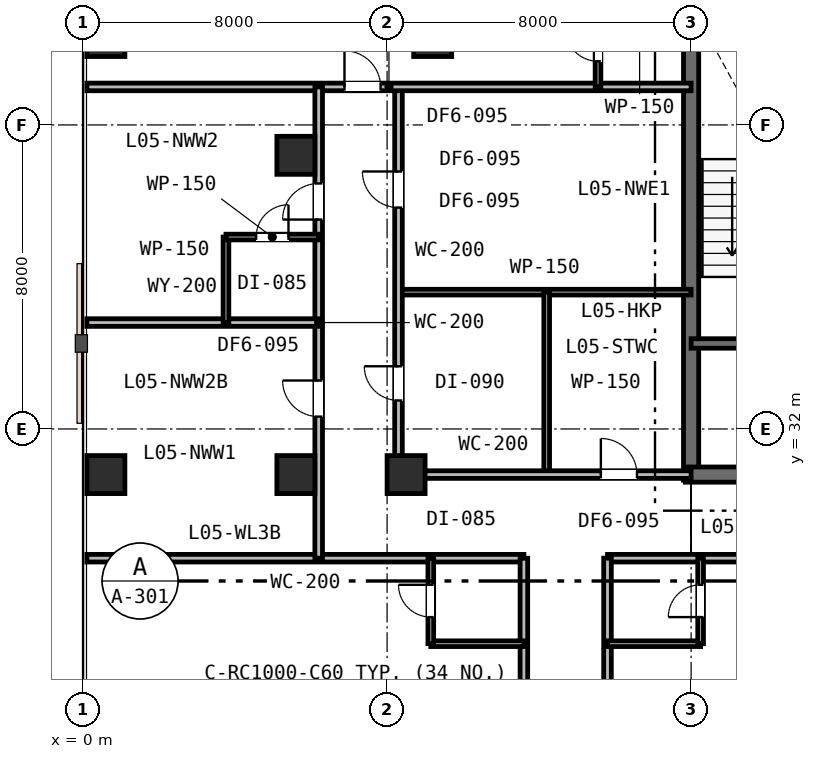
"""IFC4 building model, lengths in metres.
Left out: names, types, materials, properties, quantities, classifications, styles, units other than length and angle.
Written with IfcOpenShell. Run it as: python <this file> out.ifc"""

import sys

from ifc_helpers import new_model, si_unit, direction, frame, frame_2d, origin, origin_2d, place, context, subcontext, project, spatial, rectangle, extrude, element, fill, save


model = new_model("IFC4")
c1 = context("Model", 3, precision=1e-05, world=origin(), true_north=direction((0.0, 1.0)))
c2 = subcontext(c1, "Body", "Model", "MODEL_VIEW")
j1 = project(units=[si_unit("LENGTHUNIT", "METRE"), si_unit("PLANEANGLEUNIT", "RADIAN")], contexts=[c1])
p1 = place(None, origin())
s1 = spatial("IfcSite", under=j1, at=p1, CompositionType="ELEMENT")
p2 = place(p1, origin())
s2 = spatial("IfcBuilding", under=s1, at=p2, CompositionType="ELEMENT")
p3 = place(p2, frame((0.0, 0.0, 25.8)))
s3 = spatial("IfcBuildingStorey", under=s2, at=p3, CompositionType="ELEMENT", Elevation=25.8)
p4 = place(p3, frame((16.0, 30.65, 0.0), z_axis=(0.0, 0.0, 1.0), x_axis=(0.0, 1.0, 0.0)))
e1 = element("IfcWall", 1, at=p4, inside=s3, PredefinedType="SHEAR", context=c2, shape_type="SweptSolid", body=[
    extrude(rectangle(XDim=12.3, YDim=0.4, at=frame_2d((6.15, 0.0))), origin(), (0.0, 0.0, 1.0), 3.6),
])
p5 = place(p3, frame((15.85, 30.8, 0.0), z_axis=(0.0, 0.0, 1.0), x_axis=(1.0, 0.0, 0.0)))
e2 = element("IfcWall", 2, at=p5, inside=s3, PredefinedType="SHEAR", context=c2, shape_type="SweptSolid", body=[
    extrude(rectangle(XDim=11.2, YDim=0.4, at=frame_2d((5.6, 0.0))), origin(), (0.0, 0.0, 1.0), 3.6),
])
p6 = place(p5, frame((2.45, 0.0, 0.0)))
e3 = element("IfcOpeningElement", 3, at=p6, cuts=e2, PredefinedType="OPENING", context=c2, shape_type="SweptSolid", body=[
    extrude(rectangle(XDim=1.1, YDim=2.15, at=frame_2d((0.55, 1.075))), frame((0.0, 0.21, 0.0), z_axis=(0.0, -1.0, 0.0), x_axis=(1.0, 0.0, 0.0)), (0.0, 0.0, 1.0), 0.42),
])
p7 = place(p3, frame((16.0, 34.25, 0.0), z_axis=(0.0, 0.0, 1.0), x_axis=(1.0, 0.0, 0.0)))
e4 = element("IfcWall", 4, at=p7, inside=s3, PredefinedType="SHEAR", context=c2, shape_type="SweptSolid", body=[
    extrude(rectangle(XDim=6.05, YDim=0.25, at=frame_2d((3.025, 0.0))), origin(), (0.0, 0.0, 1.0), 3.6),
])
p8 = place(p7, frame((1.25, 0.0, 0.0)))
e5 = element("IfcOpeningElement", 5, at=p8, cuts=e4, PredefinedType="OPENING", context=c2, shape_type="SweptSolid", body=[
    extrude(rectangle(XDim=1.0, YDim=2.15, at=frame_2d((0.5, 1.075))), frame((0.0, 0.135, 0.0), z_axis=(0.0, -1.0, 0.0), x_axis=(1.0, 0.0, 0.0)), (0.0, 0.0, 1.0), 0.27),
])
p9 = place(p7, frame((4.2, 0.0, 0.0)))
e6 = element("IfcOpeningElement", 6, at=p9, cuts=e4, PredefinedType="OPENING", context=c2, shape_type="SweptSolid", body=[
    extrude(rectangle(XDim=1.1, YDim=2.15, at=frame_2d((0.55, 1.075))), frame((0.0, 0.135, 0.0), z_axis=(0.0, -1.0, 0.0), x_axis=(1.0, 0.0, 0.0)), (0.0, 0.0, 1.0), 0.27),
])
for number, where, z_axis, x_axis in (
    (7, (5.6, 30.8, 0.0), (0.0, 0.0, 1.0), (1.0, 0.0, 0.0)),
    (8, (5.6, 39.2, 0.0), (0.0, 0.0, 1.0), (1.0, 0.0, 0.0)),
    (9, (8.5, 30.8, 0.0), (0.0, 0.0, 1.0), (1.0, 0.0, 0.0)),
    (10, (9.2, 42.3, 0.0), (0.0, 0.0, 1.0), (1.0, 0.0, 0.0)),
    (11, (0.6, 30.8, 0.0), (0.0, 0.0, 1.0), (1.0, 0.0, 0.0)),
    (12, (0.6, 42.3, 0.0), (0.0, 0.0, 1.0), (1.0, 0.0, 0.0)),
):
    element("IfcColumn", number, at=place(p3, frame(where, z_axis=z_axis, x_axis=x_axis)), inside=s3, PredefinedType="COLUMN", context=c2, shape_type="SweptSolid", body=[
        extrude(rectangle(XDim=1.0, YDim=1.0, at=origin_2d()), origin(), (0.0, 0.0, 1.0), 3.6),
    ])
p10 = place(p3, frame((0.1, 28.6, 0.0), z_axis=(0.0, 0.0, 1.0), x_axis=(1.0, 0.0, 0.0)))
e13 = element("IfcWall", 13, at=p10, inside=s3, PredefinedType="PARTITIONING", context=c2, shape_type="SweptSolid", body=[
    extrude(rectangle(XDim=11.5, YDim=0.2, at=frame_2d((5.75, 0.0))), origin(), (0.0, 0.0, 1.0), 2.68),
])
p11 = place(p3, frame((13.8, 28.6, 0.0), z_axis=(0.0, 0.0, 1.0), x_axis=(1.0, 0.0, 0.0)))
e14 = element("IfcWall", 14, at=p11, inside=s3, PredefinedType="PARTITIONING", context=c2, shape_type="SweptSolid", body=[
    extrude(rectangle(XDim=36.6, YDim=0.2, at=frame_2d((18.3, 0.0))), origin(), (0.0, 0.0, 1.0), 2.68),
])
p12 = place(p11, frame((12.3, 0.0, 0.0)))
e15 = element("IfcOpeningElement", 15, at=p12, cuts=e14, PredefinedType="OPENING", context=c2, shape_type="SweptSolid", body=[
    extrude(rectangle(XDim=0.95, YDim=2.15, at=frame_2d((0.475, 1.075))), frame((0.0, 0.11, 0.0), z_axis=(0.0, -1.0, 0.0), x_axis=(1.0, 0.0, 0.0)), (0.0, 0.0, 1.0), 0.22),
])
p13 = place(p11, frame((20.075, 0.0, 0.0)))
e16 = element("IfcOpeningElement", 16, at=p13, cuts=e14, PredefinedType="OPENING", context=c2, shape_type="SweptSolid", body=[
    extrude(rectangle(XDim=0.95, YDim=2.15, at=frame_2d((0.475, 1.075))), frame((0.0, 0.11, 0.0), z_axis=(0.0, -1.0, 0.0), x_axis=(1.0, 0.0, 0.0)), (0.0, 0.0, 1.0), 0.22),
])
p14 = place(p11, frame((26.829, 0.0, 0.0)))
e17 = element("IfcOpeningElement", 17, at=p14, cuts=e14, PredefinedType="OPENING", context=c2, shape_type="SweptSolid", body=[
    extrude(rectangle(XDim=0.95, YDim=2.15, at=frame_2d((0.475, 1.075))), frame((0.0, 0.11, 0.0), z_axis=(0.0, -1.0, 0.0), x_axis=(1.0, 0.0, 0.0)), (0.0, 0.0, 1.0), 0.22),
])
p15 = place(p11, frame((32.669, 0.0, 0.0)))
e18 = element("IfcOpeningElement", 18, at=p15, cuts=e14, PredefinedType="OPENING", context=c2, shape_type="SweptSolid", body=[
    extrude(rectangle(XDim=0.95, YDim=2.15, at=frame_2d((0.475, 1.075))), frame((0.0, 0.11, 0.0), z_axis=(0.0, -1.0, 0.0), x_axis=(1.0, 0.0, 0.0)), (0.0, 0.0, 1.0), 0.22),
])
p16 = place(p3, frame((8.3, 35.6, 0.0), z_axis=(0.0, 0.0, 1.0), x_axis=(1.0, 0.0, 0.0)))
e19 = element("IfcWall", 19, at=p16, inside=s3, PredefinedType="PARTITIONING", context=c2, shape_type="SweptSolid", body=[
    extrude(rectangle(XDim=7.7, YDim=0.15, at=frame_2d((3.85, 0.0))), origin(), (0.0, 0.0, 1.0), 2.68),
])
p17 = place(p3, frame((12.2, 30.8, 0.0), z_axis=(0.0, 0.0, 1.0), x_axis=(0.0, 1.0, 0.0)))
e20 = element("IfcWall", 20, at=p17, inside=s3, PredefinedType="PARTITIONING", context=c2, shape_type="SweptSolid", body=[
    extrude(rectangle(XDim=4.8, YDim=0.15, at=frame_2d((2.4, 0.0))), origin(), (0.0, 0.0, 1.0), 2.68),
])
p18 = place(p3, frame((8.3, 30.8, 0.0), z_axis=(0.0, 0.0, 1.0), x_axis=(1.0, 0.0, 0.0)))
e21 = element("IfcWall", 21, at=p18, inside=s3, PredefinedType="PARTITIONING", context=c2, shape_type="SweptSolid", body=[
    extrude(rectangle(XDim=7.7, YDim=0.2, at=frame_2d((3.85, 0.0))), origin(), (0.0, 0.0, 1.0), 2.68),
])
p19 = place(p18, frame((5.325, 0.0, 0.0)))
e22 = element("IfcOpeningElement", 22, at=p19, cuts=e21, PredefinedType="OPENING", context=c2, shape_type="SweptSolid", body=[
    extrude(rectangle(XDim=0.95, YDim=2.15, at=frame_2d((0.475, 1.075))), frame((0.0, 0.11, 0.0), z_axis=(0.0, -1.0, 0.0), x_axis=(1.0, 0.0, 0.0)), (0.0, 0.0, 1.0), 0.22),
])
p20 = place(p3, frame((8.3, 30.8, 0.0), z_axis=(0.0, 0.0, 1.0), x_axis=(0.0, 1.0, 0.0)))
e23 = element("IfcWall", 23, at=p20, inside=s3, PredefinedType="PARTITIONING", context=c2, shape_type="SweptSolid", body=[
    extrude(rectangle(XDim=10.2, YDim=0.2, at=frame_2d((5.1, 0.0))), origin(), (0.0, 0.0, 1.0), 2.68),
])
p21 = place(p20, frame((1.95, 0.0, 0.0)))
e24 = element("IfcOpeningElement", 24, at=p21, cuts=e23, PredefinedType="OPENING", context=c2, shape_type="SweptSolid", body=[
    extrude(rectangle(XDim=0.9, YDim=2.15, at=frame_2d((0.45, 1.075))), frame((0.0, 0.11, 0.0), z_axis=(0.0, -1.0, 0.0), x_axis=(1.0, 0.0, 0.0)), (0.0, 0.0, 1.0), 0.22),
])
p22 = place(p20, frame((7.025, 0.0, 0.0)))
e25 = element("IfcOpeningElement", 25, at=p22, cuts=e23, PredefinedType="OPENING", context=c2, shape_type="SweptSolid", body=[
    extrude(rectangle(XDim=0.95, YDim=2.15, at=frame_2d((0.475, 1.075))), frame((0.0, 0.11, 0.0), z_axis=(0.0, -1.0, 0.0), x_axis=(1.0, 0.0, 0.0)), (0.0, 0.0, 1.0), 0.22),
])
p23 = place(p3, frame((0.1, 41.0, 0.0), z_axis=(0.0, 0.0, 1.0), x_axis=(1.0, 0.0, 0.0)))
e26 = element("IfcWall", 26, at=p23, inside=s3, PredefinedType="PARTITIONING", context=c2, shape_type="SweptSolid", body=[
    extrude(rectangle(XDim=15.9, YDim=0.2, at=frame_2d((7.95, 0.0))), origin(), (0.0, 0.0, 1.0), 2.68),
])
p24 = place(p23, frame((6.779, 0.0, 0.0)))
e27 = element("IfcOpeningElement", 27, at=p24, cuts=e26, PredefinedType="OPENING", context=c2, shape_type="SweptSolid", body=[
    extrude(rectangle(XDim=0.95, YDim=2.15, at=frame_2d((0.475, 1.075))), frame((0.0, 0.11, 0.0), z_axis=(0.0, -1.0, 0.0), x_axis=(1.0, 0.0, 0.0)), (0.0, 0.0, 1.0), 0.22),
])
p25 = place(p3, frame((13.55, 41.0, 0.0), z_axis=(0.0, 0.0, 1.0), x_axis=(0.0, 1.0, 0.0)))
e28 = element("IfcWall", 28, at=p25, inside=s3, PredefinedType="PARTITIONING", context=c2, shape_type="SweptSolid", body=[
    extrude(rectangle(XDim=2.2, YDim=0.15, at=frame_2d((1.1, 0.0))), origin(), (0.0, 0.0, 1.0), 3.33),
])
p26 = place(p25, frame((0.675, 0.0, 0.0)))
e29 = element("IfcOpeningElement", 29, at=p26, cuts=e28, PredefinedType="OPENING", context=c2, shape_type="SweptSolid", body=[
    extrude(rectangle(XDim=0.85, YDim=2.15, at=frame_2d((0.425, 1.075))), frame((0.0, 0.085, 0.0), z_axis=(0.0, -1.0, 0.0), x_axis=(1.0, 0.0, 0.0)), (0.0, 0.0, 1.0), 0.17),
])
p27 = place(p3, frame((6.2, 28.6, 0.0), z_axis=(0.0, 0.0, 1.0), x_axis=(0.0, 1.0, 0.0)))
e30 = element("IfcWall", 30, at=p27, inside=s3, PredefinedType="PARTITIONING", context=c2, shape_type="SweptSolid", body=[
    extrude(rectangle(XDim=12.4, YDim=0.2, at=frame_2d((6.2, 0.0))), origin(), (0.0, 0.0, 1.0), 2.68),
])
p28 = place(p27, frame((3.725, 0.0, 0.0)))
e31 = element("IfcOpeningElement", 31, at=p28, cuts=e30, PredefinedType="OPENING", context=c2, shape_type="SweptSolid", body=[
    extrude(rectangle(XDim=0.95, YDim=2.15, at=frame_2d((0.475, 1.075))), frame((0.0, 0.11, 0.0), z_axis=(0.0, -1.0, 0.0), x_axis=(1.0, 0.0, 0.0)), (0.0, 0.0, 1.0), 0.22),
])
p29 = place(p27, frame((8.91, 0.0, 0.0)))
e32 = element("IfcOpeningElement", 32, at=p29, cuts=e30, PredefinedType="OPENING", context=c2, shape_type="SweptSolid", body=[
    extrude(rectangle(XDim=0.95, YDim=2.15, at=frame_2d((0.475, 1.075))), frame((0.0, 0.11, 0.0), z_axis=(0.0, -1.0, 0.0), x_axis=(1.0, 0.0, 0.0)), (0.0, 0.0, 1.0), 0.22),
])
p30 = place(p3, frame((0.1, 34.8, 0.0), z_axis=(0.0, 0.0, 1.0), x_axis=(1.0, 0.0, 0.0)))
e33 = element("IfcWall", 33, at=p30, inside=s3, PredefinedType="PARTITIONING", context=c2, shape_type="SweptSolid", body=[
    extrude(rectangle(XDim=6.1, YDim=0.2, at=frame_2d((3.05, 0.0))), origin(), (0.0, 0.0, 1.0), 2.68),
])
p31 = place(p3, frame((3.76, 34.8, 0.0), z_axis=(0.0, 0.0, 1.0), x_axis=(0.0, 1.0, 0.0)))
e34 = element("IfcWall", 34, at=p31, inside=s3, PredefinedType="PARTITIONING", context=c2, shape_type="SweptSolid", body=[
    extrude(rectangle(XDim=2.25, YDim=0.15, at=frame_2d((1.125, 0.0))), origin(), (0.0, 0.0, 1.0), 3.33),
])
p32 = place(p3, frame((3.76, 37.05, 0.0), z_axis=(0.0, 0.0, 1.0), x_axis=(1.0, 0.0, 0.0)))
e35 = element("IfcWall", 35, at=p32, inside=s3, PredefinedType="PARTITIONING", context=c2, shape_type="SweptSolid", body=[
    extrude(rectangle(XDim=2.44, YDim=0.15, at=frame_2d((1.22, 0.0))), origin(), (0.0, 0.0, 1.0), 2.68),
])
p33 = place(p32, frame((0.795, 0.0, 0.0)))
e36 = element("IfcOpeningElement", 36, at=p33, cuts=e35, PredefinedType="OPENING", context=c2, shape_type="SweptSolid", body=[
    extrude(rectangle(XDim=0.85, YDim=2.15, at=frame_2d((0.425, 1.075))), frame((0.0, 0.085, 0.0), z_axis=(0.0, -1.0, 0.0), x_axis=(1.0, 0.0, 0.0)), (0.0, 0.0, 1.0), 0.17),
])
p34 = place(p3, frame((11.6, 5.6, 0.0), z_axis=(0.0, 0.0, 1.0), x_axis=(0.0, 1.0, 0.0)))
e37 = element("IfcWall", 37, at=p34, inside=s3, PredefinedType="PARTITIONING", context=c2, shape_type="SweptSolid", body=[
    extrude(rectangle(XDim=23.0, YDim=0.2, at=frame_2d((11.5, 0.0))), origin(), (0.0, 0.0, 1.0), 2.68),
])
p35 = place(p34, frame((2.19, 0.0, 0.0)))
e38 = element("IfcOpeningElement", 38, at=p35, cuts=e37, PredefinedType="OPENING", context=c2, shape_type="SweptSolid", body=[
    extrude(rectangle(XDim=0.95, YDim=2.15, at=frame_2d((0.475, 1.075))), frame((0.0, 0.11, 0.0), z_axis=(0.0, -1.0, 0.0), x_axis=(1.0, 0.0, 0.0)), (0.0, 0.0, 1.0), 0.22),
])
p36 = place(p34, frame((9.29, 0.0, 0.0)))
e39 = element("IfcOpeningElement", 39, at=p36, cuts=e37, PredefinedType="OPENING", context=c2, shape_type="SweptSolid", body=[
    extrude(rectangle(XDim=0.95, YDim=2.15, at=frame_2d((0.475, 1.075))), frame((0.0, 0.11, 0.0), z_axis=(0.0, -1.0, 0.0), x_axis=(1.0, 0.0, 0.0)), (0.0, 0.0, 1.0), 0.22),
])
p37 = place(p34, frame((16.64, 0.0, 0.0)))
e40 = element("IfcOpeningElement", 40, at=p37, cuts=e37, PredefinedType="OPENING", context=c2, shape_type="SweptSolid", body=[
    extrude(rectangle(XDim=0.95, YDim=2.15, at=frame_2d((0.475, 1.075))), frame((0.0, 0.11, 0.0), z_axis=(0.0, -1.0, 0.0), x_axis=(1.0, 0.0, 0.0)), (0.0, 0.0, 1.0), 0.22),
])
p38 = place(p3, frame((13.8, 5.6, 0.0), z_axis=(0.0, 0.0, 1.0), x_axis=(0.0, 1.0, 0.0)))
e41 = element("IfcWall", 41, at=p38, inside=s3, PredefinedType="PARTITIONING", context=c2, shape_type="SweptSolid", body=[
    extrude(rectangle(XDim=23.0, YDim=0.2, at=frame_2d((11.5, 0.0))), origin(), (0.0, 0.0, 1.0), 2.68),
])
p39 = place(p38, frame((0.752, 0.0, 0.0)))
e42 = element("IfcOpeningElement", 42, at=p39, cuts=e41, PredefinedType="OPENING", context=c2, shape_type="SweptSolid", body=[
    extrude(rectangle(XDim=0.95, YDim=2.15, at=frame_2d((0.475, 1.075))), frame((0.0, 0.11, 0.0), z_axis=(0.0, -1.0, 0.0), x_axis=(1.0, 0.0, 0.0)), (0.0, 0.0, 1.0), 0.22),
])
p40 = place(p38, frame((9.29, 0.0, 0.0)))
e43 = element("IfcOpeningElement", 43, at=p40, cuts=e41, PredefinedType="OPENING", context=c2, shape_type="SweptSolid", body=[
    extrude(rectangle(XDim=0.95, YDim=2.15, at=frame_2d((0.475, 1.075))), frame((0.0, 0.11, 0.0), z_axis=(0.0, -1.0, 0.0), x_axis=(1.0, 0.0, 0.0)), (0.0, 0.0, 1.0), 0.22),
])
p41 = place(p38, frame((16.494, 0.0, 0.0)))
e44 = element("IfcOpeningElement", 44, at=p41, cuts=e41, PredefinedType="OPENING", context=c2, shape_type="SweptSolid", body=[
    extrude(rectangle(XDim=0.95, YDim=2.15, at=frame_2d((0.475, 1.075))), frame((0.0, 0.11, 0.0), z_axis=(0.0, -1.0, 0.0), x_axis=(1.0, 0.0, 0.0)), (0.0, 0.0, 1.0), 0.22),
])
p42 = place(p3, frame((9.15, 26.35, 0.0), z_axis=(0.0, 0.0, 1.0), x_axis=(1.0, 0.0, 0.0)))
e45 = element("IfcWall", 45, at=p42, inside=s3, PredefinedType="PARTITIONING", context=c2, shape_type="SweptSolid", body=[
    extrude(rectangle(XDim=2.45, YDim=0.15, at=frame_2d((1.225, 0.0))), origin(), (0.0, 0.0, 1.0), 3.33),
])
p43 = place(p3, frame((9.15, 26.35, 0.0), z_axis=(0.0, 0.0, 1.0), x_axis=(0.0, 1.0, 0.0)))
e46 = element("IfcWall", 46, at=p43, inside=s3, PredefinedType="PARTITIONING", context=c2, shape_type="SweptSolid", body=[
    extrude(rectangle(XDim=2.25, YDim=0.15, at=frame_2d((1.125, 0.0))), origin(), (0.0, 0.0, 1.0), 3.33),
])
p44 = place(p43, frame((0.7, 0.0, 0.0)))
e47 = element("IfcOpeningElement", 47, at=p44, cuts=e46, PredefinedType="OPENING", context=c2, shape_type="SweptSolid", body=[
    extrude(rectangle(XDim=0.85, YDim=2.15, at=frame_2d((0.425, 1.075))), frame((0.0, 0.085, 0.0), z_axis=(0.0, -1.0, 0.0), x_axis=(1.0, 0.0, 0.0)), (0.0, 0.0, 1.0), 0.17),
])
p45 = place(p3, frame((13.8, 26.35, 0.0), z_axis=(0.0, 0.0, 1.0), x_axis=(1.0, 0.0, 0.0)))
e48 = element("IfcWall", 48, at=p45, inside=s3, PredefinedType="PARTITIONING", context=c2, shape_type="SweptSolid", body=[
    extrude(rectangle(XDim=2.45, YDim=0.15, at=frame_2d((1.225, 0.0))), origin(), (0.0, 0.0, 1.0), 2.68),
])
p46 = place(p3, frame((16.25, 26.35, 0.0), z_axis=(0.0, 0.0, 1.0), x_axis=(0.0, 1.0, 0.0)))
e49 = element("IfcWall", 49, at=p46, inside=s3, PredefinedType="PARTITIONING", context=c2, shape_type="SweptSolid", body=[
    extrude(rectangle(XDim=2.25, YDim=0.15, at=frame_2d((1.125, 0.0))), origin(), (0.0, 0.0, 1.0), 2.68),
])
p47 = place(p46, frame((0.7, 0.0, 0.0)))
e50 = element("IfcOpeningElement", 50, at=p47, cuts=e49, PredefinedType="OPENING", context=c2, shape_type="SweptSolid", body=[
    extrude(rectangle(XDim=0.85, YDim=2.15, at=frame_2d((0.425, 1.075))), frame((0.0, 0.085, 0.0), z_axis=(0.0, -1.0, 0.0), x_axis=(1.0, 0.0, 0.0)), (0.0, 0.0, 1.0), 0.17),
])
p48 = place(p19, origin())
e51 = element("IfcDoor", 51, at=p48, inside=s3, OperationType="SINGLE_SWING_LEFT", PredefinedType="DOOR", context=c2, shape_type="SweptSolid", body=[
    extrude(rectangle(XDim=0.95, YDim=2.15, at=frame_2d((0.475, 1.075))), frame((0.0, 0.025, 0.0), z_axis=(0.0, -1.0, 0.0), x_axis=(1.0, 0.0, 0.0)), (0.0, 0.0, 1.0), 0.05),
])
fill(e22, e51)
p49 = place(p21, origin())
e52 = element("IfcDoor", 52, at=p49, inside=s3, OperationType="SINGLE_SWING_RIGHT", PredefinedType="DOOR", context=c2, shape_type="SweptSolid", body=[
    extrude(rectangle(XDim=0.9, YDim=2.15, at=frame_2d((0.45, 1.075))), frame((0.0, 0.025, 0.0), z_axis=(0.0, -1.0, 0.0), x_axis=(1.0, 0.0, 0.0)), (0.0, 0.0, 1.0), 0.05),
])
fill(e24, e52)
p50 = place(p24, origin())
e53 = element("IfcDoor", 53, at=p50, inside=s3, OperationType="SINGLE_SWING_LEFT", PredefinedType="DOOR", context=c2, shape_type="SweptSolid", body=[
    extrude(rectangle(XDim=0.95, YDim=2.15, at=frame_2d((0.475, 1.075))), frame((0.0, 0.025, 0.0), z_axis=(0.0, -1.0, 0.0), x_axis=(1.0, 0.0, 0.0)), (0.0, 0.0, 1.0), 0.05),
])
fill(e27, e53)
p51 = place(p26, origin())
e54 = element("IfcDoor", 54, at=p51, inside=s3, OperationType="SINGLE_SWING_RIGHT", PredefinedType="DOOR", context=c2, shape_type="SweptSolid", body=[
    extrude(rectangle(XDim=0.85, YDim=2.15, at=frame_2d((0.425, 1.075))), frame((0.0, 0.025, 0.0), z_axis=(0.0, -1.0, 0.0), x_axis=(1.0, 0.0, 0.0)), (0.0, 0.0, 1.0), 0.05),
])
fill(e29, e54)
p52 = place(p28, origin())
e55 = element("IfcDoor", 55, at=p52, inside=s3, OperationType="SINGLE_SWING_RIGHT", PredefinedType="DOOR", context=c2, shape_type="SweptSolid", body=[
    extrude(rectangle(XDim=0.95, YDim=2.15, at=frame_2d((0.475, 1.075))), frame((0.0, 0.025, 0.0), z_axis=(0.0, -1.0, 0.0), x_axis=(1.0, 0.0, 0.0)), (0.0, 0.0, 1.0), 0.05),
])
fill(e31, e55)
p53 = place(p29, origin())
e56 = element("IfcDoor", 56, at=p53, inside=s3, OperationType="SINGLE_SWING_LEFT", PredefinedType="DOOR", context=c2, shape_type="SweptSolid", body=[
    extrude(rectangle(XDim=0.95, YDim=2.15, at=frame_2d((0.475, 1.075))), frame((0.0, 0.025, 0.0), z_axis=(0.0, -1.0, 0.0), x_axis=(1.0, 0.0, 0.0)), (0.0, 0.0, 1.0), 0.05),
])
fill(e32, e56)
p54 = place(p33, origin())
e57 = element("IfcDoor", 57, at=p54, inside=s3, OperationType="SINGLE_SWING_RIGHT", PredefinedType="DOOR", context=c2, shape_type="SweptSolid", body=[
    extrude(rectangle(XDim=0.85, YDim=2.15, at=frame_2d((0.425, 1.075))), frame((0.0, 0.025, 0.0), z_axis=(0.0, -1.0, 0.0), x_axis=(1.0, 0.0, 0.0)), (0.0, 0.0, 1.0), 0.05),
])
fill(e36, e57)
p55 = place(p22, origin())
e58 = element("IfcDoor", 58, at=p55, inside=s3, OperationType="SINGLE_SWING_RIGHT", PredefinedType="DOOR", context=c2, shape_type="SweptSolid", body=[
    extrude(rectangle(XDim=0.95, YDim=2.15, at=frame_2d((0.475, 1.075))), frame((0.0, 0.025, 0.0), z_axis=(0.0, -1.0, 0.0), x_axis=(1.0, 0.0, 0.0)), (0.0, 0.0, 1.0), 0.05),
])
fill(e25, e58)
p56 = place(p44, origin())
e59 = element("IfcDoor", 59, at=p56, inside=s3, OperationType="SINGLE_SWING_RIGHT", PredefinedType="DOOR", context=c2, shape_type="SweptSolid", body=[
    extrude(rectangle(XDim=0.85, YDim=2.15, at=frame_2d((0.425, 1.075))), frame((0.0, 0.025, 0.0), z_axis=(0.0, -1.0, 0.0), x_axis=(1.0, 0.0, 0.0)), (0.0, 0.0, 1.0), 0.05),
])
fill(e47, e59)
p57 = place(p47, origin())
e60 = element("IfcDoor", 60, at=p57, inside=s3, OperationType="SINGLE_SWING_LEFT", PredefinedType="DOOR", context=c2, shape_type="SweptSolid", body=[
    extrude(rectangle(XDim=0.85, YDim=2.15, at=frame_2d((0.425, 1.075))), frame((0.0, 0.025, 0.0), z_axis=(0.0, -1.0, 0.0), x_axis=(1.0, 0.0, 0.0)), (0.0, 0.0, 1.0), 0.05),
])
fill(e50, e60)
save(model, sys.argv[1])
